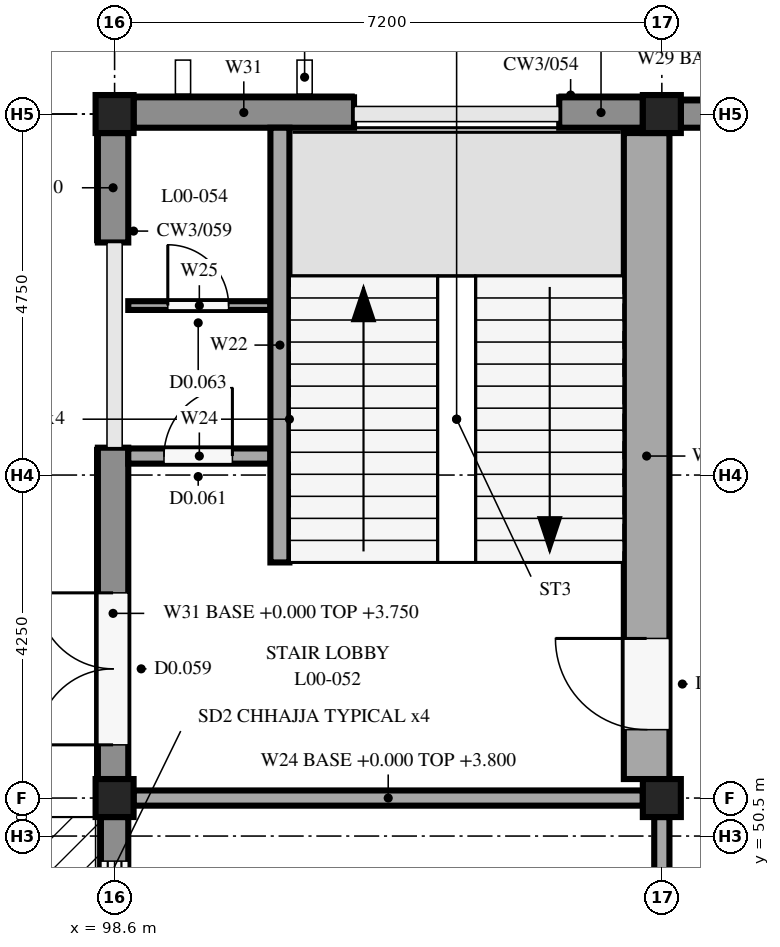
"""IFC4 building model, lengths in metres.
Left out: names, types, materials, properties, quantities, classifications, styles, units other than length and angle.
Written with IfcOpenShell. Run it as: python <this file> out.ifc"""

import sys

from ifc_helpers import new_model, si_unit, direction, frame, frame_2d, origin, origin_2d, place, context, subcontext, project, spatial, rectangle, extrude, element, fill, save


model = new_model("IFC4")
c1 = context("Model", 3, precision=1e-05, world=origin(), true_north=direction((0.0, 1.0)))
c2 = subcontext(c1, "Body", "Model", "MODEL_VIEW")
j1 = project(units=[si_unit("LENGTHUNIT", "METRE"), si_unit("PLANEANGLEUNIT", "RADIAN")], contexts=[c1])
p1 = place(None, origin())
s1 = spatial("IfcSite", under=j1, at=p1, CompositionType="ELEMENT")
p2 = place(p1, origin())
s2 = spatial("IfcBuilding", under=s1, at=p2, CompositionType="ELEMENT")
p3 = place(p2, origin())
s3 = spatial("IfcBuildingStorey", under=s2, at=p3, CompositionType="ELEMENT", Elevation=0.0)
for number, where, z_axis, x_axis in (
    (1, (98.6, 51.0, 0.0), (0.0, 0.0, 1.0), (1.0, 0.0, 0.0)),
    (2, (98.6, 60.0, 0.0), (0.0, 0.0, 1.0), (1.0, 0.0, 0.0)),
    (3, (105.8, 51.0, 0.0), (0.0, 0.0, 1.0), (1.0, 0.0, 0.0)),
    (4, (105.8, 60.0, 0.0), (0.0, 0.0, 1.0), (1.0, 0.0, 0.0)),
):
    element("IfcColumn", number, at=place(p3, frame(where, z_axis=z_axis, x_axis=x_axis)), inside=s3, PredefinedType="COLUMN", context=c2, shape_type="SweptSolid", body=[
        extrude(rectangle(XDim=0.5, YDim=0.5, at=origin_2d()), origin(), (0.0, 0.0, 1.0), 4.25),
    ])
p4 = place(p3, frame((98.6, 42.25, 0.0), z_axis=(0.0, 0.0, 1.0), x_axis=(0.0, 1.0, 0.0)))
e5 = element("IfcWall", 5, at=p4, inside=s3, PredefinedType="STANDARD", context=c2, shape_type="SweptSolid", body=[
    extrude(rectangle(XDim=8.5, YDim=0.36, at=frame_2d((4.25, 0.0))), origin(), (0.0, 0.0, 1.0), 3.75),
])
p5 = place(p4, frame((0.58, 0.0, 1.2)))
e6 = element("IfcOpeningElement", 6, at=p5, cuts=e5, PredefinedType="OPENING", context=c2, shape_type="SweptSolid", body=[
    extrude(rectangle(XDim=1.4, YDim=2.4, at=frame_2d((0.7, 1.2))), frame((0.0, 0.19, 0.0), z_axis=(0.0, -1.0, 0.0), x_axis=(1.0, 0.0, 0.0)), (0.0, 0.0, 1.0), 0.38),
])
p6 = place(p4, frame((2.56, 0.0, 1.2)))
e7 = element("IfcOpeningElement", 7, at=p6, cuts=e5, PredefinedType="OPENING", context=c2, shape_type="SweptSolid", body=[
    extrude(rectangle(XDim=1.4, YDim=2.4, at=frame_2d((0.7, 1.2))), frame((0.0, 0.19, 0.0), z_axis=(0.0, -1.0, 0.0), x_axis=(1.0, 0.0, 0.0)), (0.0, 0.0, 1.0), 0.38),
])
p7 = place(p4, frame((4.54, 0.0, 1.2)))
e8 = element("IfcOpeningElement", 8, at=p7, cuts=e5, PredefinedType="OPENING", context=c2, shape_type="SweptSolid", body=[
    extrude(rectangle(XDim=1.4, YDim=2.4, at=frame_2d((0.7, 1.2))), frame((0.0, 0.19, 0.0), z_axis=(0.0, -1.0, 0.0), x_axis=(1.0, 0.0, 0.0)), (0.0, 0.0, 1.0), 0.38),
])
p8 = place(p4, frame((6.52, 0.0, 1.2)))
e9 = element("IfcOpeningElement", 9, at=p8, cuts=e5, PredefinedType="OPENING", context=c2, shape_type="SweptSolid", body=[
    extrude(rectangle(XDim=1.4, YDim=2.4, at=frame_2d((0.7, 1.2))), frame((0.0, 0.19, 0.0), z_axis=(0.0, -1.0, 0.0), x_axis=(1.0, 0.0, 0.0)), (0.0, 0.0, 1.0), 0.38),
])
p9 = place(p3, frame((98.58, 51.25, 0.0), z_axis=(0.0, 0.0, 1.0), x_axis=(0.0, 1.0, 0.0)))
e10 = element("IfcWall", 10, at=p9, inside=s3, PredefinedType="STANDARD", context=c2, shape_type="SweptSolid", body=[
    extrude(rectangle(XDim=4.36, YDim=0.4, at=frame_2d((2.18, 0.0))), origin(), (0.0, 0.0, 1.0), 3.75),
])
p10 = place(p9, frame((0.45, 0.0, 0.0)))
e11 = element("IfcOpeningElement", 11, at=p10, cuts=e10, PredefinedType="OPENING", context=c2, shape_type="SweptSolid", body=[
    extrude(rectangle(XDim=2.0, YDim=2.2, at=frame_2d((1.0, 1.1))), frame((0.0, 0.21, 0.0), z_axis=(0.0, -1.0, 0.0), x_axis=(1.0, 0.0, 0.0)), (0.0, 0.0, 1.0), 0.42),
])
p11 = place(p3, frame((98.58, 58.31, 0.0), z_axis=(0.0, 0.0, 1.0), x_axis=(0.0, 1.0, 0.0)))
e12 = element("IfcWall", 12, at=p11, inside=s3, PredefinedType="STANDARD", context=c2, shape_type="SweptSolid", body=[
    extrude(rectangle(XDim=1.44, YDim=0.4, at=frame_2d((0.72, 0.0))), origin(), (0.0, 0.0, 1.0), 3.75),
])
p12 = place(p3, frame((98.85, 60.02, 0.0), z_axis=(0.0, 0.0, 1.0), x_axis=(1.0, 0.0, 0.0)))
e13 = element("IfcWall", 13, at=p12, inside=s3, PredefinedType="STANDARD", context=c2, shape_type="SweptSolid", body=[
    extrude(rectangle(XDim=2.9, YDim=0.4, at=frame_2d((1.45, 0.0))), origin(), (0.0, 0.0, 1.0), 3.8),
])
p13 = place(p3, frame((104.45, 60.02, 0.0), z_axis=(0.0, 0.0, 1.0), x_axis=(1.0, 0.0, 0.0)))
e14 = element("IfcWall", 14, at=p13, inside=s3, PredefinedType="STANDARD", context=c2, shape_type="SweptSolid", body=[
    extrude(rectangle(XDim=1.1, YDim=0.4, at=frame_2d((0.55, 0.0))), origin(), (0.0, 0.0, 1.0), 3.8),
])
p14 = place(p3, frame((106.05, 60.0, 0.0), z_axis=(0.0, 0.0, 1.0), x_axis=(1.0, 0.0, 0.0)))
e15 = element("IfcWall", 15, at=p14, inside=s3, PredefinedType="STANDARD", context=c2, shape_type="SweptSolid", body=[
    extrude(rectangle(XDim=2.2, YDim=0.36, at=frame_2d((1.1, 0.0))), origin(), (0.0, 0.0, 1.0), 3.9),
])
p15 = place(p14, frame((0.3, 0.0, 0.0)))
e16 = element("IfcOpeningElement", 16, at=p15, cuts=e15, PredefinedType="OPENING", context=c2, shape_type="SweptSolid", body=[
    extrude(rectangle(XDim=1.6, YDim=2.1, at=frame_2d((0.8, 1.05))), frame((0.0, 0.19, 0.0), z_axis=(0.0, -1.0, 0.0), x_axis=(1.0, 0.0, 0.0)), (0.0, 0.0, 1.0), 0.38),
])
p16 = place(p3, frame((100.775, 54.1, 0.0), z_axis=(0.0, 0.0, 1.0), x_axis=(0.0, 1.0, 0.0)))
e17 = element("IfcWall", 17, at=p16, inside=s3, PredefinedType="SOLIDWALL", context=c2, shape_type="SweptSolid", body=[
    extrude(rectangle(XDim=5.72, YDim=0.25, at=frame_2d((2.86, 0.0))), origin(), (0.0, 0.0, 1.0), 4.25),
])
p17 = place(p3, frame((105.6, 51.25, 0.0), z_axis=(0.0, 0.0, 1.0), x_axis=(0.0, 1.0, 0.0)))
e18 = element("IfcWall", 18, at=p17, inside=s3, PredefinedType="SOLIDWALL", context=c2, shape_type="SweptSolid", body=[
    extrude(rectangle(XDim=8.5, YDim=0.6, at=frame_2d((4.25, 0.0))), origin(), (0.0, 0.0, 1.0), 4.25),
])
p18 = place(p17, frame((0.65, 0.0, 0.0)))
e19 = element("IfcOpeningElement", 19, at=p18, cuts=e18, PredefinedType="OPENING", context=c2, shape_type="SweptSolid", body=[
    extrude(rectangle(XDim=1.2, YDim=2.1, at=frame_2d((0.6, 1.05))), frame((0.0, 0.31, 0.0), z_axis=(0.0, -1.0, 0.0), x_axis=(1.0, 0.0, 0.0)), (0.0, 0.0, 1.0), 0.62),
])
p19 = place(p3, frame((98.78, 55.5, 0.0), z_axis=(0.0, 0.0, 1.0), x_axis=(1.0, 0.0, 0.0)))
e20 = element("IfcWall", 20, at=p19, inside=s3, PredefinedType="SOLIDWALL", context=c2, shape_type="SweptSolid", body=[
    extrude(rectangle(XDim=1.87, YDim=0.2, at=frame_2d((0.935, 0.0))), origin(), (0.0, 0.0, 1.0), 4.25),
])
p20 = place(p19, frame((0.47, 0.0, 0.0)))
e21 = element("IfcOpeningElement", 21, at=p20, cuts=e20, PredefinedType="OPENING", context=c2, shape_type="SweptSolid", body=[
    extrude(rectangle(XDim=0.9, YDim=2.1, at=frame_2d((0.45, 1.05))), frame((0.0, 0.11, 0.0), z_axis=(0.0, -1.0, 0.0), x_axis=(1.0, 0.0, 0.0)), (0.0, 0.0, 1.0), 0.22),
])
p21 = place(p3, frame((98.78, 57.48, 0.0), z_axis=(0.0, 0.0, 1.0), x_axis=(1.0, 0.0, 0.0)))
e22 = element("IfcWall", 22, at=p21, inside=s3, PredefinedType="PARTITIONING", context=c2, shape_type="SweptSolid", body=[
    extrude(rectangle(XDim=1.87, YDim=0.115, at=frame_2d((0.935, 0.0))), origin(), (0.0, 0.0, 1.0), 4.25),
])
p22 = place(p21, frame((0.52, 0.0, 0.0)))
e23 = element("IfcOpeningElement", 23, at=p22, cuts=e22, PredefinedType="OPENING", context=c2, shape_type="SweptSolid", body=[
    extrude(rectangle(XDim=0.8, YDim=2.1, at=frame_2d((0.4, 1.05))), frame((0.0, 0.067, 0.0), z_axis=(0.0, -1.0, 0.0), x_axis=(1.0, 0.0, 0.0)), (0.0, 0.0, 1.0), 0.135),
])
p23 = place(p3, frame((98.85, 51.0, 0.0), z_axis=(0.0, 0.0, 1.0), x_axis=(1.0, 0.0, 0.0)))
e24 = element("IfcWall", 24, at=p23, inside=s3, PredefinedType="SOLIDWALL", context=c2, shape_type="SweptSolid", body=[
    extrude(rectangle(XDim=6.7, YDim=0.2, at=frame_2d((3.35, 0.0))), origin(), (0.0, 0.0, 1.0), 3.8),
])
p24 = place(p3, frame((105.8, 42.25, 0.0), z_axis=(0.0, 0.0, 1.0), x_axis=(0.0, 1.0, 0.0)))
e25 = element("IfcWall", 25, at=p24, inside=s3, PredefinedType="PARTITIONING", context=c2, shape_type="SweptSolid", body=[
    extrude(rectangle(XDim=8.5, YDim=0.2, at=frame_2d((4.25, 0.0))), origin(), (0.0, 0.0, 1.0), 3.8),
])
p25 = place(p24, frame((3.75, 0.0, 0.0)))
e26 = element("IfcOpeningElement", 26, at=p25, cuts=e25, PredefinedType="OPENING", context=c2, shape_type="SweptSolid", body=[
    extrude(rectangle(XDim=1.0, YDim=2.1, at=frame_2d((0.5, 1.05))), frame((0.0, 0.11, 0.0), z_axis=(0.0, -1.0, 0.0), x_axis=(1.0, 0.0, 0.0)), (0.0, 0.0, 1.0), 0.22),
])
p26 = place(p8, origin())
e27 = element("IfcWindow", 27, at=p26, inside=s3, PartitioningType="DOUBLE_PANEL_VERTICAL", PredefinedType="WINDOW", context=c2, shape_type="SweptSolid", body=[
    extrude(rectangle(XDim=1.4, YDim=2.4, at=frame_2d((0.7, 1.2))), frame((0.0, 0.03, 0.0), z_axis=(0.0, -1.0, 0.0), x_axis=(1.0, 0.0, 0.0)), (0.0, 0.0, 1.0), 0.06),
])
fill(e9, e27)
p27 = place(p10, origin())
e28 = element("IfcDoor", 28, at=p27, inside=s3, OperationType="DOUBLE_DOOR_SINGLE_SWING", PredefinedType="DOOR", context=c2, shape_type="SweptSolid", body=[
    extrude(rectangle(XDim=2.0, YDim=2.2, at=frame_2d((1.0, 1.1))), frame((0.0, 0.025, 0.0), z_axis=(0.0, -1.0, 0.0), x_axis=(1.0, 0.0, 0.0)), (0.0, 0.0, 1.0), 0.05),
])
fill(e11, e28)
p28 = place(p18, origin())
e29 = element("IfcDoor", 29, at=p28, inside=s3, OperationType="SINGLE_SWING_RIGHT", PredefinedType="DOOR", context=c2, shape_type="SweptSolid", body=[
    extrude(rectangle(XDim=1.2, YDim=2.1, at=frame_2d((0.6, 1.05))), frame((0.0, 0.025, 0.0), z_axis=(0.0, -1.0, 0.0), x_axis=(1.0, 0.0, 0.0)), (0.0, 0.0, 1.0), 0.05),
])
fill(e19, e29)
p29 = place(p20, origin())
e30 = element("IfcDoor", 30, at=p29, inside=s3, OperationType="SINGLE_SWING_RIGHT", PredefinedType="DOOR", context=c2, shape_type="SweptSolid", body=[
    extrude(rectangle(XDim=0.9, YDim=2.1, at=frame_2d((0.45, 1.05))), frame((0.0, 0.025, 0.0), z_axis=(0.0, -1.0, 0.0), x_axis=(1.0, 0.0, 0.0)), (0.0, 0.0, 1.0), 0.05),
])
fill(e21, e30)
p30 = place(p22, origin())
e31 = element("IfcDoor", 31, at=p30, inside=s3, OperationType="SINGLE_SWING_LEFT", PredefinedType="DOOR", context=c2, shape_type="SweptSolid", body=[
    extrude(rectangle(XDim=0.8, YDim=2.1, at=frame_2d((0.4, 1.05))), frame((0.0, 0.025, 0.0), z_axis=(0.0, -1.0, 0.0), x_axis=(1.0, 0.0, 0.0)), (0.0, 0.0, 1.0), 0.05),
])
fill(e23, e31)
save(model, sys.argv[1])
